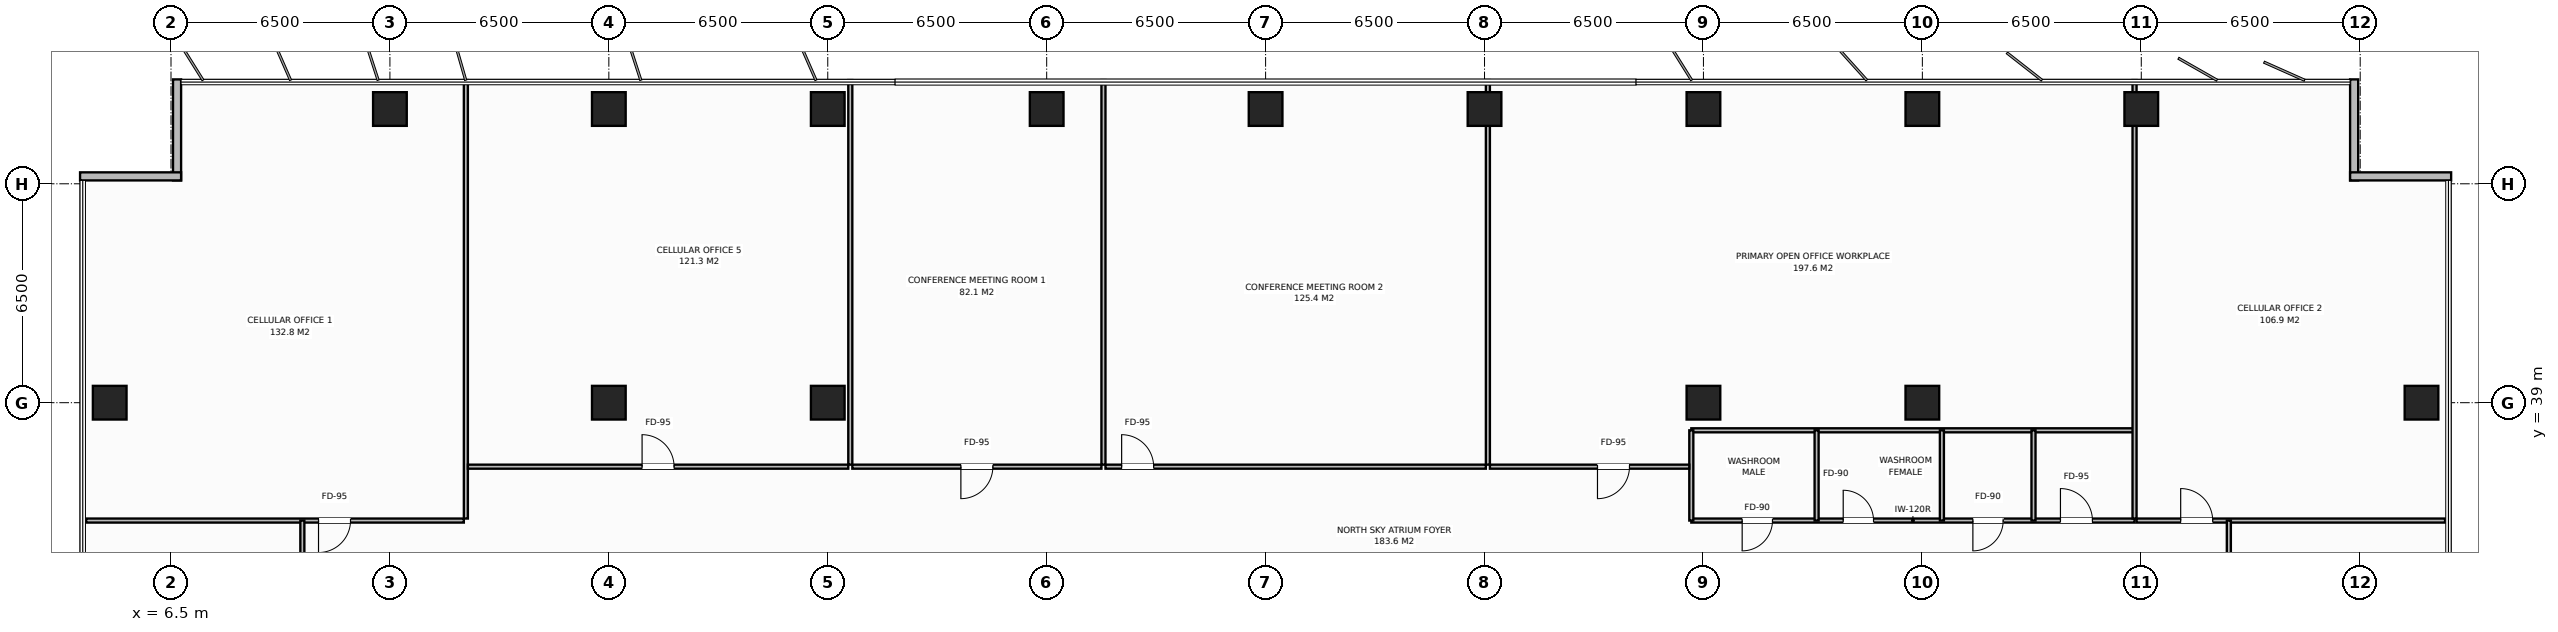
"""IFC4 building model, lengths in metres.
Left out: names, types, materials, properties, quantities, classifications, styles, units other than length and angle.
Written with IfcOpenShell. Run it as: python <this file> out.ifc"""

import sys

from ifc_helpers import new_model, si_unit, direction, frame, frame_2d, origin, origin_2d, place, context, subcontext, project, spatial, rectangle, extrude, element, fill, save


model = new_model("IFC4")
c1 = context("Model", 3, precision=1e-05, world=origin(), true_north=direction((0.0, 1.0)))
c2 = subcontext(c1, "Body", "Model", "MODEL_VIEW")
j1 = project(units=[si_unit("LENGTHUNIT", "METRE"), si_unit("PLANEANGLEUNIT", "RADIAN")], contexts=[c1])
p1 = place(None, origin())
s1 = spatial("IfcSite", under=j1, at=p1, CompositionType="ELEMENT")
p2 = place(p1, origin())
s2 = spatial("IfcBuilding", under=s1, at=p2, CompositionType="ELEMENT")
p3 = place(p2, frame((0.0, 0.0, 163.2)))
s3 = spatial("IfcBuildingStorey", under=s2, at=p3, CompositionType="ELEMENT", Elevation=163.2)
for number, where, z_axis, x_axis in (
    (1, (19.5, 39.0, 0.0), (0.0, 0.0, 1.0), (1.0, 0.0, 0.0)),
    (2, (58.5, 39.0, 0.0), (0.0, 0.0, 1.0), (1.0, 0.0, 0.0)),
    (3, (26.0, 39.0, 0.0), (0.0, 0.0, 1.0), (1.0, 0.0, 0.0)),
    (4, (52.0, 39.0, 0.0), (0.0, 0.0, 1.0), (1.0, 0.0, 0.0)),
    (5, (13.0, 47.72, 0.0), (0.0, 0.0, 1.0), (1.0, 0.0, 0.0)),
    (6, (19.5, 47.72, 0.0), (0.0, 0.0, 1.0), (1.0, 0.0, 0.0)),
    (7, (26.0, 47.72, 0.0), (0.0, 0.0, 1.0), (1.0, 0.0, 0.0)),
    (8, (32.5, 47.72, 0.0), (0.0, 0.0, 1.0), (1.0, 0.0, 0.0)),
    (9, (39.0, 47.72, 0.0), (0.0, 0.0, 1.0), (1.0, 0.0, 0.0)),
    (10, (45.5, 47.72, 0.0), (0.0, 0.0, 1.0), (1.0, 0.0, 0.0)),
    (11, (52.0, 47.72, 0.0), (0.0, 0.0, 1.0), (1.0, 0.0, 0.0)),
    (12, (58.5, 47.72, 0.0), (0.0, 0.0, 1.0), (1.0, 0.0, 0.0)),
    (13, (65.0, 47.72, 0.0), (0.0, 0.0, 1.0), (1.0, 0.0, 0.0)),
    (14, (4.68, 39.0, 0.0), (0.0, 0.0, 1.0), (1.0, 0.0, 0.0)),
    (15, (73.32, 39.0, 0.0), (0.0, 0.0, 1.0), (1.0, 0.0, 0.0)),
):
    element("IfcColumn", number, at=place(p3, frame(where, z_axis=z_axis, x_axis=x_axis)), inside=s3, PredefinedType="COLUMN", context=c2, shape_type="SweptSolid", body=[
        extrude(rectangle(XDim=1.0, YDim=1.0, at=origin_2d()), origin(), (0.0, 0.0, 1.0), 3.8),
    ])
for number, where, z_axis, x_axis in (
    (16, (6.68, 45.6, 0.0), (0.0, 0.0, 1.0), (0.0, 1.0, 0.0)),
    (17, (3.8, 45.72, 0.0), (0.0, 0.0, 1.0), (1.0, 0.0, 0.0)),
    (18, (71.32, 48.6, 0.0), (0.0, 0.0, 1.0), (0.0, -1.0, 0.0)),
    (19, (71.2, 45.72, 0.0), (0.0, 0.0, 1.0), (1.0, 0.0, 0.0)),
):
    element("IfcWall", number, at=place(p3, frame(where, z_axis=z_axis, x_axis=x_axis)), inside=s3, PredefinedType="STANDARD", context=c2, shape_type="SweptSolid", body=[
        extrude(rectangle(XDim=3.0, YDim=0.24, at=frame_2d((1.5, 0.0))), origin(), (0.0, 0.0, 1.0), 3.572),
    ])
p4 = place(p3, frame((51.64, 35.5, 0.0), z_axis=(0.0, 0.0, 1.0), x_axis=(1.0, 0.0, 0.0)))
e20 = element("IfcWall", 20, at=p4, inside=s3, PredefinedType="PARTITIONING", context=c2, shape_type="SweptSolid", body=[
    extrude(rectangle(XDim=13.16, YDim=0.12, at=frame_2d((6.58, 0.0))), origin(), (0.0, 0.0, 1.0), 3.572),
])
p5 = place(p4, frame((1.51, 0.0, 0.0)))
e21 = element("IfcOpeningElement", 21, at=p5, cuts=e20, PredefinedType="OPENING", context=c2, shape_type="SweptSolid", body=[
    extrude(rectangle(XDim=0.9, YDim=2.15, at=frame_2d((0.45, 1.075))), frame((0.0, 0.07, 0.0), z_axis=(0.0, -1.0, 0.0), x_axis=(1.0, 0.0, 0.0)), (0.0, 0.0, 1.0), 0.14),
])
p6 = place(p4, frame((4.51, 0.0, 0.0)))
e22 = element("IfcOpeningElement", 22, at=p6, cuts=e20, PredefinedType="OPENING", context=c2, shape_type="SweptSolid", body=[
    extrude(rectangle(XDim=0.9, YDim=2.15, at=frame_2d((0.45, 1.075))), frame((0.0, 0.07, 0.0), z_axis=(0.0, -1.0, 0.0), x_axis=(1.0, 0.0, 0.0)), (0.0, 0.0, 1.0), 0.14),
])
p7 = place(p4, frame((8.36, 0.0, 0.0)))
e23 = element("IfcOpeningElement", 23, at=p7, cuts=e20, PredefinedType="OPENING", context=c2, shape_type="SweptSolid", body=[
    extrude(rectangle(XDim=0.9, YDim=2.15, at=frame_2d((0.45, 1.075))), frame((0.0, 0.07, 0.0), z_axis=(0.0, -1.0, 0.0), x_axis=(1.0, 0.0, 0.0)), (0.0, 0.0, 1.0), 0.14),
])
p8 = place(p4, frame((10.96, 0.0, 0.0)))
e24 = element("IfcOpeningElement", 24, at=p8, cuts=e20, PredefinedType="OPENING", context=c2, shape_type="SweptSolid", body=[
    extrude(rectangle(XDim=0.95, YDim=2.15, at=frame_2d((0.475, 1.075))), frame((0.0, 0.07, 0.0), z_axis=(0.0, -1.0, 0.0), x_axis=(1.0, 0.0, 0.0)), (0.0, 0.0, 1.0), 0.14),
])
p9 = place(p3, frame((51.64, 38.18, 0.0), z_axis=(0.0, 0.0, 1.0), x_axis=(1.0, 0.0, 0.0)))
e25 = element("IfcWall", 25, at=p9, inside=s3, PredefinedType="PARTITIONING", context=c2, shape_type="SweptSolid", body=[
    extrude(rectangle(XDim=13.16, YDim=0.12, at=frame_2d((6.58, 0.0))), origin(), (0.0, 0.0, 1.0), 3.572),
])
for number, where, z_axis, x_axis in (
    (26, (51.64, 35.5, 0.0), (0.0, 0.0, 1.0), (0.0, 1.0, 0.0)),
    (27, (55.36, 35.5, 0.0), (0.0, 0.0, 1.0), (0.0, 1.0, 0.0)),
    (28, (59.08, 35.5, 0.0), (0.0, 0.0, 1.0), (0.0, 1.0, 0.0)),
    (29, (61.8, 35.5, 0.0), (0.0, 0.0, 1.0), (0.0, 1.0, 0.0)),
):
    element("IfcWall", number, at=place(p3, frame(where, z_axis=z_axis, x_axis=x_axis)), inside=s3, PredefinedType="PARTITIONING", context=c2, shape_type="SweptSolid", body=[
        extrude(rectangle(XDim=2.68, YDim=0.12, at=frame_2d((1.34, 0.0))), origin(), (0.0, 0.0, 1.0), 3.572),
    ])
p10 = place(p3, frame((15.255, 35.56, 0.0), z_axis=(0.0, 0.0, 1.0), x_axis=(0.0, 1.0, 0.0)))
e30 = element("IfcWall", 30, at=p10, inside=s3, PredefinedType="PARTITIONING", context=c2, shape_type="SweptSolid", body=[
    extrude(rectangle(XDim=13.02, YDim=0.12, at=frame_2d((6.51, 0.0))), origin(), (0.0, 0.0, 1.0), 3.572),
])
p11 = place(p3, frame((3.98, 35.5, 0.0), z_axis=(0.0, 0.0, 1.0), x_axis=(1.0, 0.0, 0.0)))
e31 = element("IfcWall", 31, at=p11, inside=s3, PredefinedType="PARTITIONING", context=c2, shape_type="SweptSolid", body=[
    extrude(rectangle(XDim=11.215, YDim=0.12, at=frame_2d((5.607, 0.0))), origin(), (0.0, 0.0, 1.0), 3.572),
])
p12 = place(p11, frame((6.9, 0.0, 0.0)))
e32 = element("IfcOpeningElement", 32, at=p12, cuts=e31, PredefinedType="OPENING", context=c2, shape_type="SweptSolid", body=[
    extrude(rectangle(XDim=0.95, YDim=2.15, at=frame_2d((0.475, 1.075))), frame((0.0, 0.07, 0.0), z_axis=(0.0, -1.0, 0.0), x_axis=(1.0, 0.0, 0.0)), (0.0, 0.0, 1.0), 0.14),
])
p13 = place(p3, frame((26.669, 37.16, 0.0), z_axis=(0.0, 0.0, 1.0), x_axis=(0.0, 1.0, 0.0)))
e33 = element("IfcWall", 33, at=p13, inside=s3, PredefinedType="PARTITIONING", context=c2, shape_type="SweptSolid", body=[
    extrude(rectangle(XDim=11.42, YDim=0.12, at=frame_2d((5.71, 0.0))), origin(), (0.0, 0.0, 1.0), 3.572),
])
p14 = place(p3, frame((15.315, 37.1, 0.0), z_axis=(0.0, 0.0, 1.0), x_axis=(1.0, 0.0, 0.0)))
e34 = element("IfcWall", 34, at=p14, inside=s3, PredefinedType="PARTITIONING", context=c2, shape_type="SweptSolid", body=[
    extrude(rectangle(XDim=11.294, YDim=0.12, at=frame_2d((5.647, 0.0))), origin(), (0.0, 0.0, 1.0), 3.572),
])
p15 = place(p14, frame((5.172, 0.0, 0.0)))
e35 = element("IfcOpeningElement", 35, at=p15, cuts=e34, PredefinedType="OPENING", context=c2, shape_type="SweptSolid", body=[
    extrude(rectangle(XDim=0.95, YDim=2.15, at=frame_2d((0.475, 1.075))), frame((0.0, 0.07, 0.0), z_axis=(0.0, -1.0, 0.0), x_axis=(1.0, 0.0, 0.0)), (0.0, 0.0, 1.0), 0.14),
])
p16 = place(p3, frame((34.186, 37.16, 0.0), z_axis=(0.0, 0.0, 1.0), x_axis=(0.0, 1.0, 0.0)))
e36 = element("IfcWall", 36, at=p16, inside=s3, PredefinedType="PARTITIONING", context=c2, shape_type="SweptSolid", body=[
    extrude(rectangle(XDim=11.42, YDim=0.12, at=frame_2d((5.71, 0.0))), origin(), (0.0, 0.0, 1.0), 3.572),
])
p17 = place(p3, frame((26.729, 37.1, 0.0), z_axis=(0.0, 0.0, 1.0), x_axis=(1.0, 0.0, 0.0)))
e37 = element("IfcWall", 37, at=p17, inside=s3, PredefinedType="PARTITIONING", context=c2, shape_type="SweptSolid", body=[
    extrude(rectangle(XDim=7.396, YDim=0.12, at=frame_2d((3.698, 0.0))), origin(), (0.0, 0.0, 1.0), 3.572),
])
p18 = place(p17, frame((3.223, 0.0, 0.0)))
e38 = element("IfcOpeningElement", 38, at=p18, cuts=e37, PredefinedType="OPENING", context=c2, shape_type="SweptSolid", body=[
    extrude(rectangle(XDim=0.95, YDim=2.15, at=frame_2d((0.475, 1.075))), frame((0.0, 0.07, 0.0), z_axis=(0.0, -1.0, 0.0), x_axis=(1.0, 0.0, 0.0)), (0.0, 0.0, 1.0), 0.14),
])
p19 = place(p3, frame((45.6, 37.16, 0.0), z_axis=(0.0, 0.0, 1.0), x_axis=(0.0, 1.0, 0.0)))
e39 = element("IfcWall", 39, at=p19, inside=s3, PredefinedType="PARTITIONING", context=c2, shape_type="SweptSolid", body=[
    extrude(rectangle(XDim=11.42, YDim=0.12, at=frame_2d((5.71, 0.0))), origin(), (0.0, 0.0, 1.0), 3.022),
])
p20 = place(p3, frame((34.246, 37.1, 0.0), z_axis=(0.0, 0.0, 1.0), x_axis=(1.0, 0.0, 0.0)))
e40 = element("IfcWall", 40, at=p20, inside=s3, PredefinedType="PARTITIONING", context=c2, shape_type="SweptSolid", body=[
    extrude(rectangle(XDim=11.294, YDim=0.12, at=frame_2d((5.647, 0.0))), origin(), (0.0, 0.0, 1.0), 3.572),
])
p21 = place(p20, frame((0.48, 0.0, 0.0)))
e41 = element("IfcOpeningElement", 41, at=p21, cuts=e40, PredefinedType="OPENING", context=c2, shape_type="SweptSolid", body=[
    extrude(rectangle(XDim=0.95, YDim=2.15, at=frame_2d((0.475, 1.075))), frame((0.0, 0.07, 0.0), z_axis=(0.0, -1.0, 0.0), x_axis=(1.0, 0.0, 0.0)), (0.0, 0.0, 1.0), 0.14),
])
p22 = place(p3, frame((64.8, 35.56, 0.0), z_axis=(0.0, 0.0, 1.0), x_axis=(0.0, 1.0, 0.0)))
e42 = element("IfcWall", 42, at=p22, inside=s3, PredefinedType="PARTITIONING", context=c2, shape_type="SweptSolid", body=[
    extrude(rectangle(XDim=13.02, YDim=0.12, at=frame_2d((6.51, 0.0))), origin(), (0.0, 0.0, 1.0), 3.022),
])
p23 = place(p3, frame((45.66, 37.1, 0.0), z_axis=(0.0, 0.0, 1.0), x_axis=(1.0, 0.0, 0.0)))
e43 = element("IfcWall", 43, at=p23, inside=s3, PredefinedType="PARTITIONING", context=c2, shape_type="SweptSolid", body=[
    extrude(rectangle(XDim=5.92, YDim=0.12, at=frame_2d((2.96, 0.0))), origin(), (0.0, 0.0, 1.0), 3.572),
])
p24 = place(p23, frame((3.194, 0.0, 0.0)))
e44 = element("IfcOpeningElement", 44, at=p24, cuts=e43, PredefinedType="OPENING", context=c2, shape_type="SweptSolid", body=[
    extrude(rectangle(XDim=0.95, YDim=2.15, at=frame_2d((0.475, 1.075))), frame((0.0, 0.07, 0.0), z_axis=(0.0, -1.0, 0.0), x_axis=(1.0, 0.0, 0.0)), (0.0, 0.0, 1.0), 0.14),
])
p25 = place(p3, frame((64.86, 35.5, 0.0), z_axis=(0.0, 0.0, 1.0), x_axis=(1.0, 0.0, 0.0)))
e45 = element("IfcWall", 45, at=p25, inside=s3, PredefinedType="PARTITIONING", context=c2, shape_type="SweptSolid", body=[
    extrude(rectangle(XDim=9.16, YDim=0.12, at=frame_2d((4.58, 0.0))), origin(), (0.0, 0.0, 1.0), 3.572),
])
p26 = place(p25, frame((1.31, 0.0, 0.0)))
e46 = element("IfcOpeningElement", 46, at=p26, cuts=e45, PredefinedType="OPENING", context=c2, shape_type="SweptSolid", body=[
    extrude(rectangle(XDim=0.95, YDim=2.15, at=frame_2d((0.475, 1.075))), frame((0.0, 0.07, 0.0), z_axis=(0.0, -1.0, 0.0), x_axis=(1.0, 0.0, 0.0)), (0.0, 0.0, 1.0), 0.14),
])
p27 = place(p3, frame((10.4, 16.5, 0.0), z_axis=(0.0, 0.0, 1.0), x_axis=(0.0, 1.0, 0.0)))
e47 = element("IfcWall", 47, at=p27, inside=s3, PredefinedType="PARTITIONING", context=c2, shape_type="SweptSolid", body=[
    extrude(rectangle(XDim=19.0, YDim=0.12, at=frame_2d((9.5, 0.0))), origin(), (0.0, 0.0, 1.0), 3.572),
])
p28 = place(p27, frame((9.025, 0.0, 0.0)))
e48 = element("IfcOpeningElement", 48, at=p28, cuts=e47, PredefinedType="OPENING", context=c2, shape_type="SweptSolid", body=[
    extrude(rectangle(XDim=0.95, YDim=2.15, at=frame_2d((0.475, 1.075))), frame((0.0, 0.07, 0.0), z_axis=(0.0, -1.0, 0.0), x_axis=(1.0, 0.0, 0.0)), (0.0, 0.0, 1.0), 0.14),
])
p29 = place(p3, frame((67.6, 26.0, 0.0), z_axis=(0.0, 0.0, 1.0), x_axis=(0.0, 1.0, 0.0)))
e49 = element("IfcWall", 49, at=p29, inside=s3, PredefinedType="PARTITIONING", context=c2, shape_type="SweptSolid", body=[
    extrude(rectangle(XDim=9.5, YDim=0.12, at=frame_2d((4.75, 0.0))), origin(), (0.0, 0.0, 1.0), 3.572),
])
p30 = place(p29, frame((3.225, 0.0, 0.0)))
e50 = element("IfcOpeningElement", 50, at=p30, cuts=e49, PredefinedType="OPENING", context=c2, shape_type="SweptSolid", body=[
    extrude(rectangle(XDim=0.95, YDim=2.15, at=frame_2d((0.475, 1.075))), frame((0.0, 0.07, 0.0), z_axis=(0.0, -1.0, 0.0), x_axis=(1.0, 0.0, 0.0)), (0.0, 0.0, 1.0), 0.14),
])
p31 = place(p5, origin())
e51 = element("IfcDoor", 51, at=p31, inside=s3, OperationType="SINGLE_SWING_RIGHT", PredefinedType="DOOR", context=c2, shape_type="SweptSolid", body=[
    extrude(rectangle(XDim=0.9, YDim=2.15, at=frame_2d((0.45, 1.075))), frame((0.0, 0.025, 0.0), z_axis=(0.0, -1.0, 0.0), x_axis=(1.0, 0.0, 0.0)), (0.0, 0.0, 1.0), 0.05),
])
fill(e21, e51)
p32 = place(p6, origin())
e52 = element("IfcDoor", 52, at=p32, inside=s3, OperationType="SINGLE_SWING_LEFT", PredefinedType="DOOR", context=c2, shape_type="SweptSolid", body=[
    extrude(rectangle(XDim=0.9, YDim=2.15, at=frame_2d((0.45, 1.075))), frame((0.0, 0.025, 0.0), z_axis=(0.0, -1.0, 0.0), x_axis=(1.0, 0.0, 0.0)), (0.0, 0.0, 1.0), 0.05),
])
fill(e22, e52)
p33 = place(p7, origin())
e53 = element("IfcDoor", 53, at=p33, inside=s3, OperationType="SINGLE_SWING_RIGHT", PredefinedType="DOOR", context=c2, shape_type="SweptSolid", body=[
    extrude(rectangle(XDim=0.9, YDim=2.15, at=frame_2d((0.45, 1.075))), frame((0.0, 0.025, 0.0), z_axis=(0.0, -1.0, 0.0), x_axis=(1.0, 0.0, 0.0)), (0.0, 0.0, 1.0), 0.05),
])
fill(e23, e53)
p34 = place(p8, origin())
e54 = element("IfcDoor", 54, at=p34, inside=s3, OperationType="SINGLE_SWING_LEFT", PredefinedType="DOOR", context=c2, shape_type="SweptSolid", body=[
    extrude(rectangle(XDim=0.95, YDim=2.15, at=frame_2d((0.475, 1.075))), frame((0.0, 0.025, 0.0), z_axis=(0.0, -1.0, 0.0), x_axis=(1.0, 0.0, 0.0)), (0.0, 0.0, 1.0), 0.05),
])
fill(e24, e54)
p35 = place(p12, origin())
e55 = element("IfcDoor", 55, at=p35, inside=s3, OperationType="SINGLE_SWING_RIGHT", PredefinedType="DOOR", context=c2, shape_type="SweptSolid", body=[
    extrude(rectangle(XDim=0.95, YDim=2.15, at=frame_2d((0.475, 1.075))), frame((0.0, 0.025, 0.0), z_axis=(0.0, -1.0, 0.0), x_axis=(1.0, 0.0, 0.0)), (0.0, 0.0, 1.0), 0.05),
])
fill(e32, e55)
p36 = place(p15, origin())
e56 = element("IfcDoor", 56, at=p36, inside=s3, OperationType="SINGLE_SWING_LEFT", PredefinedType="DOOR", context=c2, shape_type="SweptSolid", body=[
    extrude(rectangle(XDim=0.95, YDim=2.15, at=frame_2d((0.475, 1.075))), frame((0.0, 0.025, 0.0), z_axis=(0.0, -1.0, 0.0), x_axis=(1.0, 0.0, 0.0)), (0.0, 0.0, 1.0), 0.05),
])
fill(e35, e56)
p37 = place(p18, origin())
e57 = element("IfcDoor", 57, at=p37, inside=s3, OperationType="SINGLE_SWING_RIGHT", PredefinedType="DOOR", context=c2, shape_type="SweptSolid", body=[
    extrude(rectangle(XDim=0.95, YDim=2.15, at=frame_2d((0.475, 1.075))), frame((0.0, 0.025, 0.0), z_axis=(0.0, -1.0, 0.0), x_axis=(1.0, 0.0, 0.0)), (0.0, 0.0, 1.0), 0.05),
])
fill(e38, e57)
p38 = place(p21, origin())
e58 = element("IfcDoor", 58, at=p38, inside=s3, OperationType="SINGLE_SWING_LEFT", PredefinedType="DOOR", context=c2, shape_type="SweptSolid", body=[
    extrude(rectangle(XDim=0.95, YDim=2.15, at=frame_2d((0.475, 1.075))), frame((0.0, 0.025, 0.0), z_axis=(0.0, -1.0, 0.0), x_axis=(1.0, 0.0, 0.0)), (0.0, 0.0, 1.0), 0.05),
])
fill(e41, e58)
p39 = place(p24, origin())
e59 = element("IfcDoor", 59, at=p39, inside=s3, OperationType="SINGLE_SWING_RIGHT", PredefinedType="DOOR", context=c2, shape_type="SweptSolid", body=[
    extrude(rectangle(XDim=0.95, YDim=2.15, at=frame_2d((0.475, 1.075))), frame((0.0, 0.025, 0.0), z_axis=(0.0, -1.0, 0.0), x_axis=(1.0, 0.0, 0.0)), (0.0, 0.0, 1.0), 0.05),
])
fill(e44, e59)
p40 = place(p26, origin())
e60 = element("IfcDoor", 60, at=p40, inside=s3, OperationType="SINGLE_SWING_LEFT", PredefinedType="DOOR", context=c2, shape_type="SweptSolid", body=[
    extrude(rectangle(XDim=0.95, YDim=2.15, at=frame_2d((0.475, 1.075))), frame((0.0, 0.025, 0.0), z_axis=(0.0, -1.0, 0.0), x_axis=(1.0, 0.0, 0.0)), (0.0, 0.0, 1.0), 0.05),
])
fill(e46, e60)
save(model, sys.argv[1])
